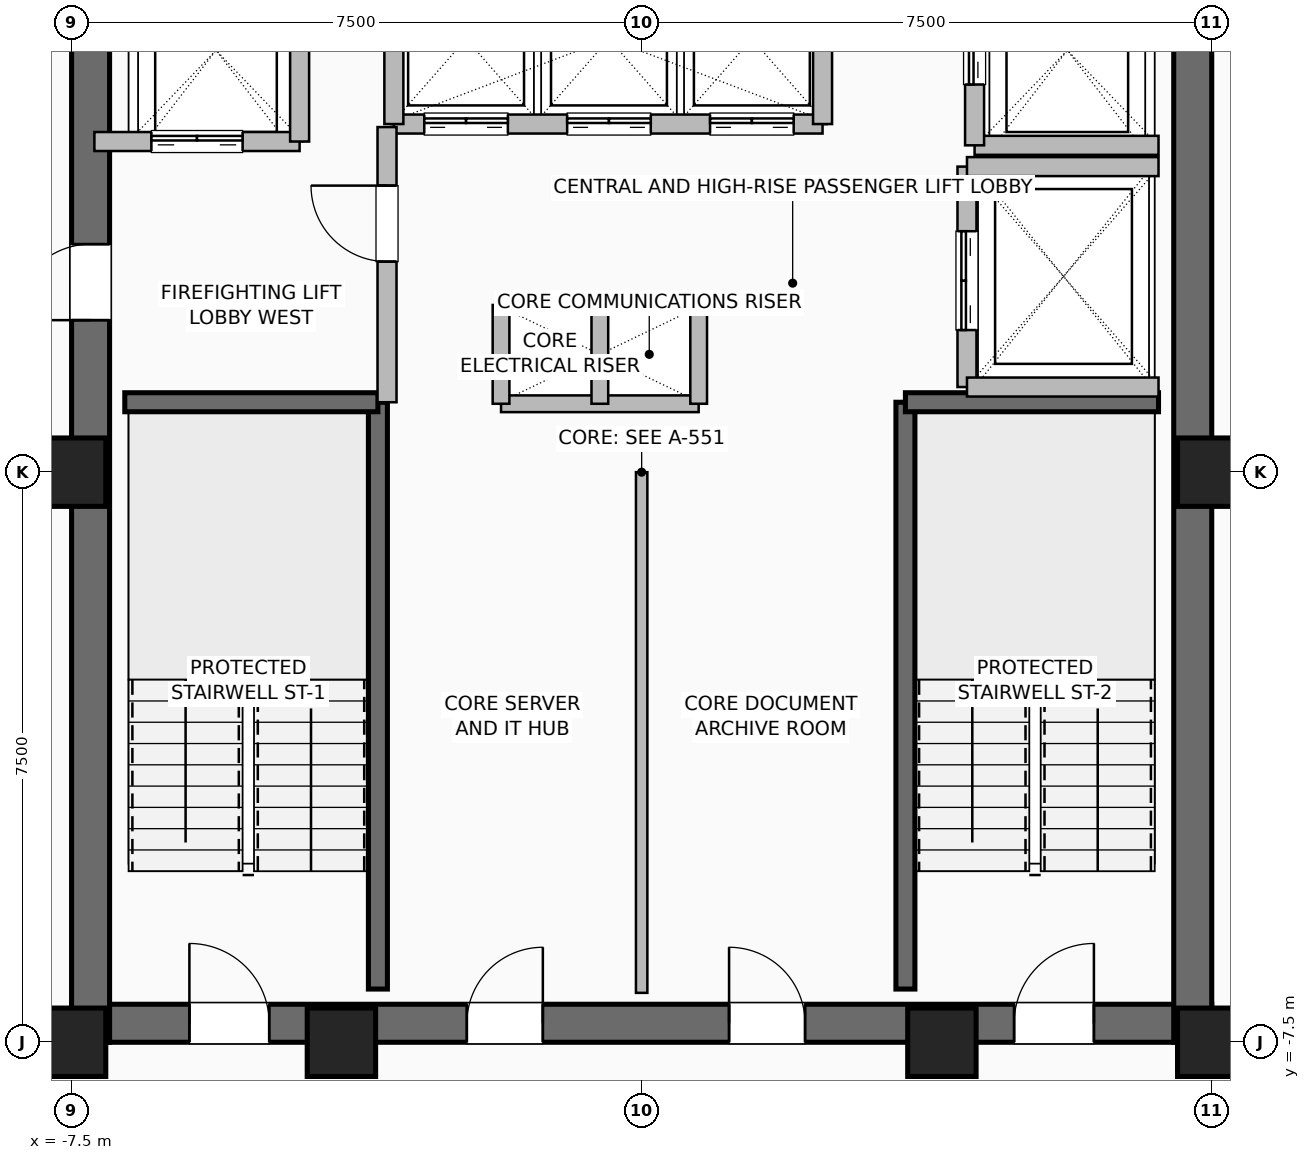
"""IFC4 building model, lengths in metres.
Left out: names, types, materials, properties, quantities, classifications, styles, units other than length and angle.
Written with IfcOpenShell. Run it as: python <this file> out.ifc"""

import sys

from ifc_helpers import new_model, si_unit, direction, frame, frame_2d, origin, origin_2d, place, context, subcontext, project, spatial, rectangle, hollow_rectangle, extrude, element, fill, save


model = new_model("IFC4")
c1 = context("Model", 3, precision=1e-05, world=origin(), true_north=direction((0.0, 1.0)))
c2 = subcontext(c1, "Body", "Model", "MODEL_VIEW")
j1 = project(units=[si_unit("LENGTHUNIT", "METRE"), si_unit("PLANEANGLEUNIT", "RADIAN")], contexts=[c1])
p1 = place(None, origin())
s1 = spatial("IfcSite", under=j1, at=p1, CompositionType="ELEMENT")
p2 = place(p1, origin())
s2 = spatial("IfcBuilding", under=s1, at=p2, CompositionType="ELEMENT")
p3 = place(p2, frame((0.0, 0.0, 202.2)))
s3 = spatial("IfcBuildingStorey", under=s2, at=p3, CompositionType="ELEMENT", Elevation=202.2)
for number, where, z_axis, x_axis in (
    (1, (-7.5, -7.5, 0.0), (0.0, 0.0, 1.0), (1.0, 0.0, 0.0)),
    (2, (-3.95, -7.5, 0.0), (0.0, 0.0, 1.0), (1.0, 0.0, 0.0)),
    (3, (3.95, -7.5, 0.0), (0.0, 0.0, 1.0), (1.0, 0.0, 0.0)),
    (4, (7.5, -7.5, 0.0), (0.0, 0.0, 1.0), (1.0, 0.0, 0.0)),
    (5, (7.5, 0.0, 0.0), (0.0, 0.0, 1.0), (1.0, 0.0, 0.0)),
    (6, (-7.5, 0.0, 0.0), (0.0, 0.0, 1.0), (1.0, 0.0, 0.0)),
):
    element("IfcColumn", number, at=place(p3, frame(where, z_axis=z_axis, x_axis=x_axis)), inside=s3, PredefinedType="COLUMN", context=c2, shape_type="SweptSolid", body=[
        extrude(hollow_rectangle(XDim=0.9, YDim=0.9, WallThickness=0.045, at=origin_2d()), origin(), (0.0, 0.0, 1.0), 3.6),
    ])
p4 = place(p3, frame((-7.5, -7.25, 0.0), z_axis=(0.0, 0.0, 1.0), x_axis=(1.0, 0.0, 0.0)))
e7 = element("IfcWall", 7, at=p4, inside=s3, PredefinedType="SHEAR", context=c2, shape_type="SweptSolid", body=[
    extrude(rectangle(XDim=15.0, YDim=0.5, at=frame_2d((7.5, 0.0))), origin(), (0.0, 0.0, 1.0), 3.36),
])
p5 = place(p4, frame((1.55, 0.0, 0.0)))
e8 = element("IfcOpeningElement", 8, at=p5, cuts=e7, PredefinedType="OPENING", context=c2, shape_type="SweptSolid", body=[
    extrude(rectangle(XDim=1.05, YDim=2.08, at=frame_2d((0.525, 1.04))), frame((0.0, 0.26, 0.0), z_axis=(0.0, -1.0, 0.0), x_axis=(1.0, 0.0, 0.0)), (0.0, 0.0, 1.0), 0.52),
])
p6 = place(p4, frame((12.4, 0.0, 0.0)))
e9 = element("IfcOpeningElement", 9, at=p6, cuts=e7, PredefinedType="OPENING", context=c2, shape_type="SweptSolid", body=[
    extrude(rectangle(XDim=1.05, YDim=2.08, at=frame_2d((0.525, 1.04))), frame((0.0, 0.26, 0.0), z_axis=(0.0, -1.0, 0.0), x_axis=(1.0, 0.0, 0.0)), (0.0, 0.0, 1.0), 0.52),
])
p7 = place(p4, frame((5.2, 0.0, 0.0)))
e10 = element("IfcOpeningElement", 10, at=p7, cuts=e7, PredefinedType="OPENING", context=c2, shape_type="SweptSolid", body=[
    extrude(rectangle(XDim=1.0, YDim=2.08, at=frame_2d((0.5, 1.04))), frame((0.0, 0.26, 0.0), z_axis=(0.0, -1.0, 0.0), x_axis=(1.0, 0.0, 0.0)), (0.0, 0.0, 1.0), 0.52),
])
p8 = place(p4, frame((8.65, 0.0, 0.0)))
e11 = element("IfcOpeningElement", 11, at=p8, cuts=e7, PredefinedType="OPENING", context=c2, shape_type="SweptSolid", body=[
    extrude(rectangle(XDim=1.0, YDim=2.08, at=frame_2d((0.5, 1.04))), frame((0.0, 0.26, 0.0), z_axis=(0.0, -1.0, 0.0), x_axis=(1.0, 0.0, 0.0)), (0.0, 0.0, 1.0), 0.52),
])
p9 = place(p3, frame((-7.25, -7.5, 0.0), z_axis=(0.0, 0.0, 1.0), x_axis=(0.0, 1.0, 0.0)))
e12 = element("IfcWall", 12, at=p9, inside=s3, PredefinedType="SHEAR", context=c2, shape_type="SweptSolid", body=[
    extrude(rectangle(XDim=15.0, YDim=0.5, at=frame_2d((7.5, 0.0))), origin(), (0.0, 0.0, 1.0), 3.36),
])
p10 = place(p9, frame((9.5, 0.0, 0.0)))
e13 = element("IfcOpeningElement", 13, at=p10, cuts=e12, PredefinedType="OPENING", context=c2, shape_type="SweptSolid", body=[
    extrude(rectangle(XDim=1.0, YDim=2.08, at=frame_2d((0.5, 1.04))), frame((0.0, 0.26, 0.0), z_axis=(0.0, -1.0, 0.0), x_axis=(1.0, 0.0, 0.0)), (0.0, 0.0, 1.0), 0.52),
])
p11 = place(p3, frame((7.25, -7.5, 0.0), z_axis=(0.0, 0.0, 1.0), x_axis=(0.0, 1.0, 0.0)))
e14 = element("IfcWall", 14, at=p11, inside=s3, PredefinedType="SHEAR", context=c2, shape_type="SweptSolid", body=[
    extrude(rectangle(XDim=15.0, YDim=0.5, at=frame_2d((7.5, 0.0))), origin(), (0.0, 0.0, 1.0), 3.36),
])
p12 = place(p3, frame((-3.47, -6.8, 0.0), z_axis=(0.0, 0.0, 1.0), x_axis=(0.0, 1.0, 0.0)))
e15 = element("IfcWall", 15, at=p12, inside=s3, PredefinedType="SHEAR", context=c2, shape_type="SweptSolid", body=[
    extrude(rectangle(XDim=7.72, YDim=0.25, at=frame_2d((3.86, 0.0))), origin(), (0.0, 0.0, 1.0), 3.36),
])
p13 = place(p3, frame((-6.8, 0.92, 0.0), z_axis=(0.0, 0.0, 1.0), x_axis=(1.0, 0.0, 0.0)))
e16 = element("IfcWall", 16, at=p13, inside=s3, PredefinedType="SHEAR", context=c2, shape_type="SweptSolid", body=[
    extrude(rectangle(XDim=3.33, YDim=0.25, at=frame_2d((1.665, 0.0))), origin(), (0.0, 0.0, 1.0), 3.36),
])
p14 = place(p3, frame((3.47, -6.8, 0.0), z_axis=(0.0, 0.0, 1.0), x_axis=(0.0, 1.0, 0.0)))
e17 = element("IfcWall", 17, at=p14, inside=s3, PredefinedType="SHEAR", context=c2, shape_type="SweptSolid", body=[
    extrude(rectangle(XDim=7.72, YDim=0.25, at=frame_2d((3.86, 0.0))), origin(), (0.0, 0.0, 1.0), 3.36),
])
p15 = place(p3, frame((3.47, 0.92, 0.0), z_axis=(0.0, 0.0, 1.0), x_axis=(1.0, 0.0, 0.0)))
e18 = element("IfcWall", 18, at=p15, inside=s3, PredefinedType="SHEAR", context=c2, shape_type="SweptSolid", body=[
    extrude(rectangle(XDim=3.33, YDim=0.25, at=frame_2d((1.665, 0.0))), origin(), (0.0, 0.0, 1.0), 3.36),
])
for number, where, z_axis, x_axis in (
    (19, (-1.85, 2.2, 0.0), (0.0, 0.0, 1.0), (1.0, 0.0, 0.0)),
    (20, (-1.85, 0.9, 0.0), (0.0, 0.0, 1.0), (1.0, 0.0, 0.0)),
):
    element("IfcWall", number, at=place(p3, frame(where, z_axis=z_axis, x_axis=x_axis)), inside=s3, PredefinedType="PARTITIONING", context=c2, shape_type="SweptSolid", body=[
        extrude(rectangle(XDim=2.6, YDim=0.22, at=frame_2d((1.3, 0.0))), origin(), (0.0, 0.0, 1.0), 3.36),
    ])
for number, where, z_axis, x_axis in (
    (21, (-0.55, 0.9, 0.0), (0.0, 0.0, 1.0), (0.0, 1.0, 0.0)),
    (22, (0.75, 0.9, 0.0), (0.0, 0.0, 1.0), (0.0, 1.0, 0.0)),
    (23, (-1.85, 0.9, 0.0), (0.0, 0.0, 1.0), (0.0, 1.0, 0.0)),
):
    element("IfcWall", number, at=place(p3, frame(where, z_axis=z_axis, x_axis=x_axis)), inside=s3, PredefinedType="PARTITIONING", context=c2, shape_type="SweptSolid", body=[
        extrude(rectangle(XDim=1.3, YDim=0.22, at=frame_2d((0.65, 0.0))), origin(), (0.0, 0.0, 1.0), 3.36),
    ])
p16 = place(p3, frame((-3.26, 4.58, 0.0), z_axis=(0.0, 0.0, 1.0), x_axis=(1.0, 0.0, 0.0)))
e24 = element("IfcWall", 24, at=p16, inside=s3, PredefinedType="SHEAR", context=c2, shape_type="SweptSolid", body=[
    extrude(rectangle(XDim=5.64, YDim=0.25, at=frame_2d((2.82, 0.0))), origin(), (0.0, 0.0, 1.0), 3.36),
])
p17 = place(p16, frame((0.4, 0.0, 0.0)))
e25 = element("IfcOpeningElement", 25, at=p17, cuts=e24, PredefinedType="OPENING", context=c2, shape_type="SweptSolid", body=[
    extrude(rectangle(XDim=1.1, YDim=2.2, at=frame_2d((0.55, 1.1))), frame((0.0, 0.135, 0.0), z_axis=(0.0, -1.0, 0.0), x_axis=(1.0, 0.0, 0.0)), (0.0, 0.0, 1.0), 0.27),
])
p18 = place(p16, frame((2.28, 0.0, 0.0)))
e26 = element("IfcOpeningElement", 26, at=p18, cuts=e24, PredefinedType="OPENING", context=c2, shape_type="SweptSolid", body=[
    extrude(rectangle(XDim=1.1, YDim=2.2, at=frame_2d((0.55, 1.1))), frame((0.0, 0.135, 0.0), z_axis=(0.0, -1.0, 0.0), x_axis=(1.0, 0.0, 0.0)), (0.0, 0.0, 1.0), 0.27),
])
p19 = place(p16, frame((4.16, 0.0, 0.0)))
e27 = element("IfcOpeningElement", 27, at=p19, cuts=e24, PredefinedType="OPENING", context=c2, shape_type="SweptSolid", body=[
    extrude(rectangle(XDim=1.1, YDim=2.2, at=frame_2d((0.55, 1.1))), frame((0.0, 0.135, 0.0), z_axis=(0.0, -1.0, 0.0), x_axis=(1.0, 0.0, 0.0)), (0.0, 0.0, 1.0), 0.27),
])
for number, where, z_axis, x_axis in (
    (28, (-3.26, 4.58, 0.0), (0.0, 0.0, 1.0), (0.0, 1.0, 0.0)),
    (29, (2.38, 4.58, 0.0), (0.0, 0.0, 1.0), (0.0, 1.0, 0.0)),
):
    element("IfcWall", number, at=place(p3, frame(where, z_axis=z_axis, x_axis=x_axis)), inside=s3, PredefinedType="SHEAR", context=c2, shape_type="SweptSolid", body=[
        extrude(rectangle(XDim=2.22, YDim=0.25, at=frame_2d((1.11, 0.0))), origin(), (0.0, 0.0, 1.0), 3.36),
    ])
p20 = place(p3, frame((-7.2, 4.35, 0.0), z_axis=(0.0, 0.0, 1.0), x_axis=(1.0, 0.0, 0.0)))
e30 = element("IfcWall", 30, at=p20, inside=s3, PredefinedType="SHEAR", context=c2, shape_type="SweptSolid", body=[
    extrude(rectangle(XDim=2.7, YDim=0.25, at=frame_2d((1.35, 0.0))), origin(), (0.0, 0.0, 1.0), 3.36),
])
p21 = place(p20, frame((0.75, 0.0, 0.0)))
e31 = element("IfcOpeningElement", 31, at=p21, cuts=e30, PredefinedType="OPENING", context=c2, shape_type="SweptSolid", body=[
    extrude(rectangle(XDim=1.2, YDim=2.2, at=frame_2d((0.6, 1.1))), frame((0.0, 0.135, 0.0), z_axis=(0.0, -1.0, 0.0), x_axis=(1.0, 0.0, 0.0)), (0.0, 0.0, 1.0), 0.27),
])
p22 = place(p3, frame((-4.5, 4.35, 0.0), z_axis=(0.0, 0.0, 1.0), x_axis=(0.0, 1.0, 0.0)))
e32 = element("IfcWall", 32, at=p22, inside=s3, PredefinedType="SHEAR", context=c2, shape_type="SweptSolid", body=[
    extrude(rectangle(XDim=2.85, YDim=0.25, at=frame_2d((1.425, 0.0))), origin(), (0.0, 0.0, 1.0), 3.36),
])
p23 = place(p3, frame((4.38, 4.3, 0.0), z_axis=(0.0, 0.0, 1.0), x_axis=(1.0, 0.0, 0.0)))
e33 = element("IfcWall", 33, at=p23, inside=s3, PredefinedType="SHEAR", context=c2, shape_type="SweptSolid", body=[
    extrude(rectangle(XDim=2.42, YDim=0.25, at=frame_2d((1.21, 0.0))), origin(), (0.0, 0.0, 1.0), 3.36),
])
p24 = place(p3, frame((4.38, 4.3, 0.0), z_axis=(0.0, 0.0, 1.0), x_axis=(0.0, 1.0, 0.0)))
e34 = element("IfcWall", 34, at=p24, inside=s3, PredefinedType="SHEAR", context=c2, shape_type="SweptSolid", body=[
    extrude(rectangle(XDim=2.5, YDim=0.25, at=frame_2d((1.25, 0.0))), origin(), (0.0, 0.0, 1.0), 3.36),
])
p25 = place(p24, frame((0.8, 0.0, 0.0)))
e35 = element("IfcOpeningElement", 35, at=p25, cuts=e34, PredefinedType="OPENING", context=c2, shape_type="SweptSolid", body=[
    extrude(rectangle(XDim=1.2, YDim=2.2, at=frame_2d((0.6, 1.1))), frame((0.0, 0.135, 0.0), z_axis=(0.0, -1.0, 0.0), x_axis=(1.0, 0.0, 0.0)), (0.0, 0.0, 1.0), 0.27),
])
p26 = place(p3, frame((4.28, 1.12, 0.0), z_axis=(0.0, 0.0, 1.0), x_axis=(0.0, 1.0, 0.0)))
e36 = element("IfcWall", 36, at=p26, inside=s3, PredefinedType="SHEAR", context=c2, shape_type="SweptSolid", body=[
    extrude(rectangle(XDim=2.9, YDim=0.25, at=frame_2d((1.45, 0.0))), origin(), (0.0, 0.0, 1.0), 3.36),
])
p27 = place(p26, frame((0.75, 0.0, 0.0)))
e37 = element("IfcOpeningElement", 37, at=p27, cuts=e36, PredefinedType="OPENING", context=c2, shape_type="SweptSolid", body=[
    extrude(rectangle(XDim=1.3, YDim=2.3, at=frame_2d((0.65, 1.15))), frame((0.0, 0.135, 0.0), z_axis=(0.0, -1.0, 0.0), x_axis=(1.0, 0.0, 0.0)), (0.0, 0.0, 1.0), 0.27),
])
for number, where, z_axis, x_axis in (
    (38, (4.28, 1.12, 0.0), (0.0, 0.0, 1.0), (1.0, 0.0, 0.0)),
    (39, (4.28, 4.02, 0.0), (0.0, 0.0, 1.0), (1.0, 0.0, 0.0)),
):
    element("IfcWall", number, at=place(p3, frame(where, z_axis=z_axis, x_axis=x_axis)), inside=s3, PredefinedType="SHEAR", context=c2, shape_type="SweptSolid", body=[
        extrude(rectangle(XDim=2.52, YDim=0.25, at=frame_2d((1.26, 0.0))), origin(), (0.0, 0.0, 1.0), 3.36),
    ])
p28 = place(p3, frame((-3.35, 0.92, 0.0), z_axis=(0.0, 0.0, 1.0), x_axis=(0.0, 1.0, 0.0)))
e40 = element("IfcWall", 40, at=p28, inside=s3, PredefinedType="SHEAR", context=c2, shape_type="SweptSolid", body=[
    extrude(rectangle(XDim=3.62, YDim=0.25, at=frame_2d((1.81, 0.0))), origin(), (0.0, 0.0, 1.0), 3.36),
])
p29 = place(p28, frame((1.85, 0.0, 0.0)))
e41 = element("IfcOpeningElement", 41, at=p29, cuts=e40, PredefinedType="OPENING", context=c2, shape_type="SweptSolid", body=[
    extrude(rectangle(XDim=1.0, YDim=2.08, at=frame_2d((0.5, 1.04))), frame((0.0, 0.135, 0.0), z_axis=(0.0, -1.0, 0.0), x_axis=(1.0, 0.0, 0.0)), (0.0, 0.0, 1.0), 0.27),
])
p30 = place(p3, frame((0.0, -6.85, 0.0), z_axis=(0.0, 0.0, 1.0), x_axis=(0.0, 1.0, 0.0)))
e42 = element("IfcWall", 42, at=p30, inside=s3, PredefinedType="PARTITIONING", context=c2, shape_type="SweptSolid", body=[
    extrude(rectangle(XDim=6.85, YDim=0.15, at=frame_2d((3.425, 0.0))), origin(), (0.0, 0.0, 1.0), 3.36),
])
p31 = place(p3, frame((7.45, -7.48, 0.0), z_axis=(0.0, 0.0, 1.0), x_axis=(1.0, 0.0, 0.0)))
e43 = element("IfcWall", 43, at=p31, inside=s3, PredefinedType="PARTITIONING", context=c2, shape_type="SweptSolid", body=[
    extrude(rectangle(XDim=0.95, YDim=0.15, at=frame_2d((0.475, 0.0))), origin(), (0.0, 0.0, 1.0), 3.36),
])
p32 = place(p5, origin())
e44 = element("IfcDoor", 44, at=p32, inside=s3, OperationType="SINGLE_SWING_LEFT", PredefinedType="DOOR", context=c2, shape_type="SweptSolid", body=[
    extrude(rectangle(XDim=1.05, YDim=2.08, at=frame_2d((0.525, 1.04))), frame((0.0, 0.025, 0.0), z_axis=(0.0, -1.0, 0.0), x_axis=(1.0, 0.0, 0.0)), (0.0, 0.0, 1.0), 0.05),
])
fill(e8, e44)
p33 = place(p6, origin())
e45 = element("IfcDoor", 45, at=p33, inside=s3, OperationType="SINGLE_SWING_RIGHT", PredefinedType="DOOR", context=c2, shape_type="SweptSolid", body=[
    extrude(rectangle(XDim=1.05, YDim=2.08, at=frame_2d((0.525, 1.04))), frame((0.0, 0.025, 0.0), z_axis=(0.0, -1.0, 0.0), x_axis=(1.0, 0.0, 0.0)), (0.0, 0.0, 1.0), 0.05),
])
fill(e9, e45)
p34 = place(p10, origin())
e46 = element("IfcDoor", 46, at=p34, inside=s3, OperationType="SINGLE_SWING_LEFT", PredefinedType="DOOR", context=c2, shape_type="SweptSolid", body=[
    extrude(rectangle(XDim=1.0, YDim=2.08, at=frame_2d((0.5, 1.04))), frame((0.0, 0.025, 0.0), z_axis=(0.0, -1.0, 0.0), x_axis=(1.0, 0.0, 0.0)), (0.0, 0.0, 1.0), 0.05),
])
fill(e13, e46)
p35 = place(p7, origin())
e47 = element("IfcDoor", 47, at=p35, inside=s3, OperationType="SINGLE_SWING_RIGHT", PredefinedType="DOOR", context=c2, shape_type="SweptSolid", body=[
    extrude(rectangle(XDim=1.0, YDim=2.08, at=frame_2d((0.5, 1.04))), frame((0.0, 0.025, 0.0), z_axis=(0.0, -1.0, 0.0), x_axis=(1.0, 0.0, 0.0)), (0.0, 0.0, 1.0), 0.05),
])
fill(e10, e47)
p36 = place(p8, origin())
e48 = element("IfcDoor", 48, at=p36, inside=s3, OperationType="SINGLE_SWING_LEFT", PredefinedType="DOOR", context=c2, shape_type="SweptSolid", body=[
    extrude(rectangle(XDim=1.0, YDim=2.08, at=frame_2d((0.5, 1.04))), frame((0.0, 0.025, 0.0), z_axis=(0.0, -1.0, 0.0), x_axis=(1.0, 0.0, 0.0)), (0.0, 0.0, 1.0), 0.05),
])
fill(e11, e48)
p37 = place(p17, origin())
e49 = element("IfcDoor", 49, at=p37, inside=s3, OperationType="DOUBLE_DOOR_SLIDING", PredefinedType="DOOR", context=c2, shape_type="SweptSolid", body=[
    extrude(rectangle(XDim=1.1, YDim=2.2, at=frame_2d((0.55, 1.1))), frame((0.0, 0.025, 0.0), z_axis=(0.0, -1.0, 0.0), x_axis=(1.0, 0.0, 0.0)), (0.0, 0.0, 1.0), 0.05),
])
fill(e25, e49)
p38 = place(p18, origin())
e50 = element("IfcDoor", 50, at=p38, inside=s3, OperationType="DOUBLE_DOOR_SLIDING", PredefinedType="DOOR", context=c2, shape_type="SweptSolid", body=[
    extrude(rectangle(XDim=1.1, YDim=2.2, at=frame_2d((0.55, 1.1))), frame((0.0, 0.025, 0.0), z_axis=(0.0, -1.0, 0.0), x_axis=(1.0, 0.0, 0.0)), (0.0, 0.0, 1.0), 0.05),
])
fill(e26, e50)
p39 = place(p19, origin())
e51 = element("IfcDoor", 51, at=p39, inside=s3, OperationType="DOUBLE_DOOR_SLIDING", PredefinedType="DOOR", context=c2, shape_type="SweptSolid", body=[
    extrude(rectangle(XDim=1.1, YDim=2.2, at=frame_2d((0.55, 1.1))), frame((0.0, 0.025, 0.0), z_axis=(0.0, -1.0, 0.0), x_axis=(1.0, 0.0, 0.0)), (0.0, 0.0, 1.0), 0.05),
])
fill(e27, e51)
p40 = place(p21, origin())
e52 = element("IfcDoor", 52, at=p40, inside=s3, OperationType="DOUBLE_DOOR_SLIDING", PredefinedType="DOOR", context=c2, shape_type="SweptSolid", body=[
    extrude(rectangle(XDim=1.2, YDim=2.2, at=frame_2d((0.6, 1.1))), frame((0.0, 0.025, 0.0), z_axis=(0.0, -1.0, 0.0), x_axis=(1.0, 0.0, 0.0)), (0.0, 0.0, 1.0), 0.05),
])
fill(e31, e52)
p41 = place(p25, origin())
e53 = element("IfcDoor", 53, at=p41, inside=s3, OperationType="DOUBLE_DOOR_SLIDING", PredefinedType="DOOR", context=c2, shape_type="SweptSolid", body=[
    extrude(rectangle(XDim=1.2, YDim=2.2, at=frame_2d((0.6, 1.1))), frame((0.0, 0.025, 0.0), z_axis=(0.0, -1.0, 0.0), x_axis=(1.0, 0.0, 0.0)), (0.0, 0.0, 1.0), 0.05),
])
fill(e35, e53)
p42 = place(p27, origin())
e54 = element("IfcDoor", 54, at=p42, inside=s3, OperationType="DOUBLE_DOOR_SLIDING", PredefinedType="DOOR", context=c2, shape_type="SweptSolid", body=[
    extrude(rectangle(XDim=1.3, YDim=2.3, at=frame_2d((0.65, 1.15))), frame((0.0, 0.025, 0.0), z_axis=(0.0, -1.0, 0.0), x_axis=(1.0, 0.0, 0.0)), (0.0, 0.0, 1.0), 0.05),
])
fill(e37, e54)
p43 = place(p29, origin())
e55 = element("IfcDoor", 55, at=p43, inside=s3, OperationType="SINGLE_SWING_RIGHT", PredefinedType="DOOR", context=c2, shape_type="SweptSolid", body=[
    extrude(rectangle(XDim=1.0, YDim=2.08, at=frame_2d((0.5, 1.04))), frame((0.0, 0.025, 0.0), z_axis=(0.0, -1.0, 0.0), x_axis=(1.0, 0.0, 0.0)), (0.0, 0.0, 1.0), 0.05),
])
fill(e41, e55)
save(model, sys.argv[1])
